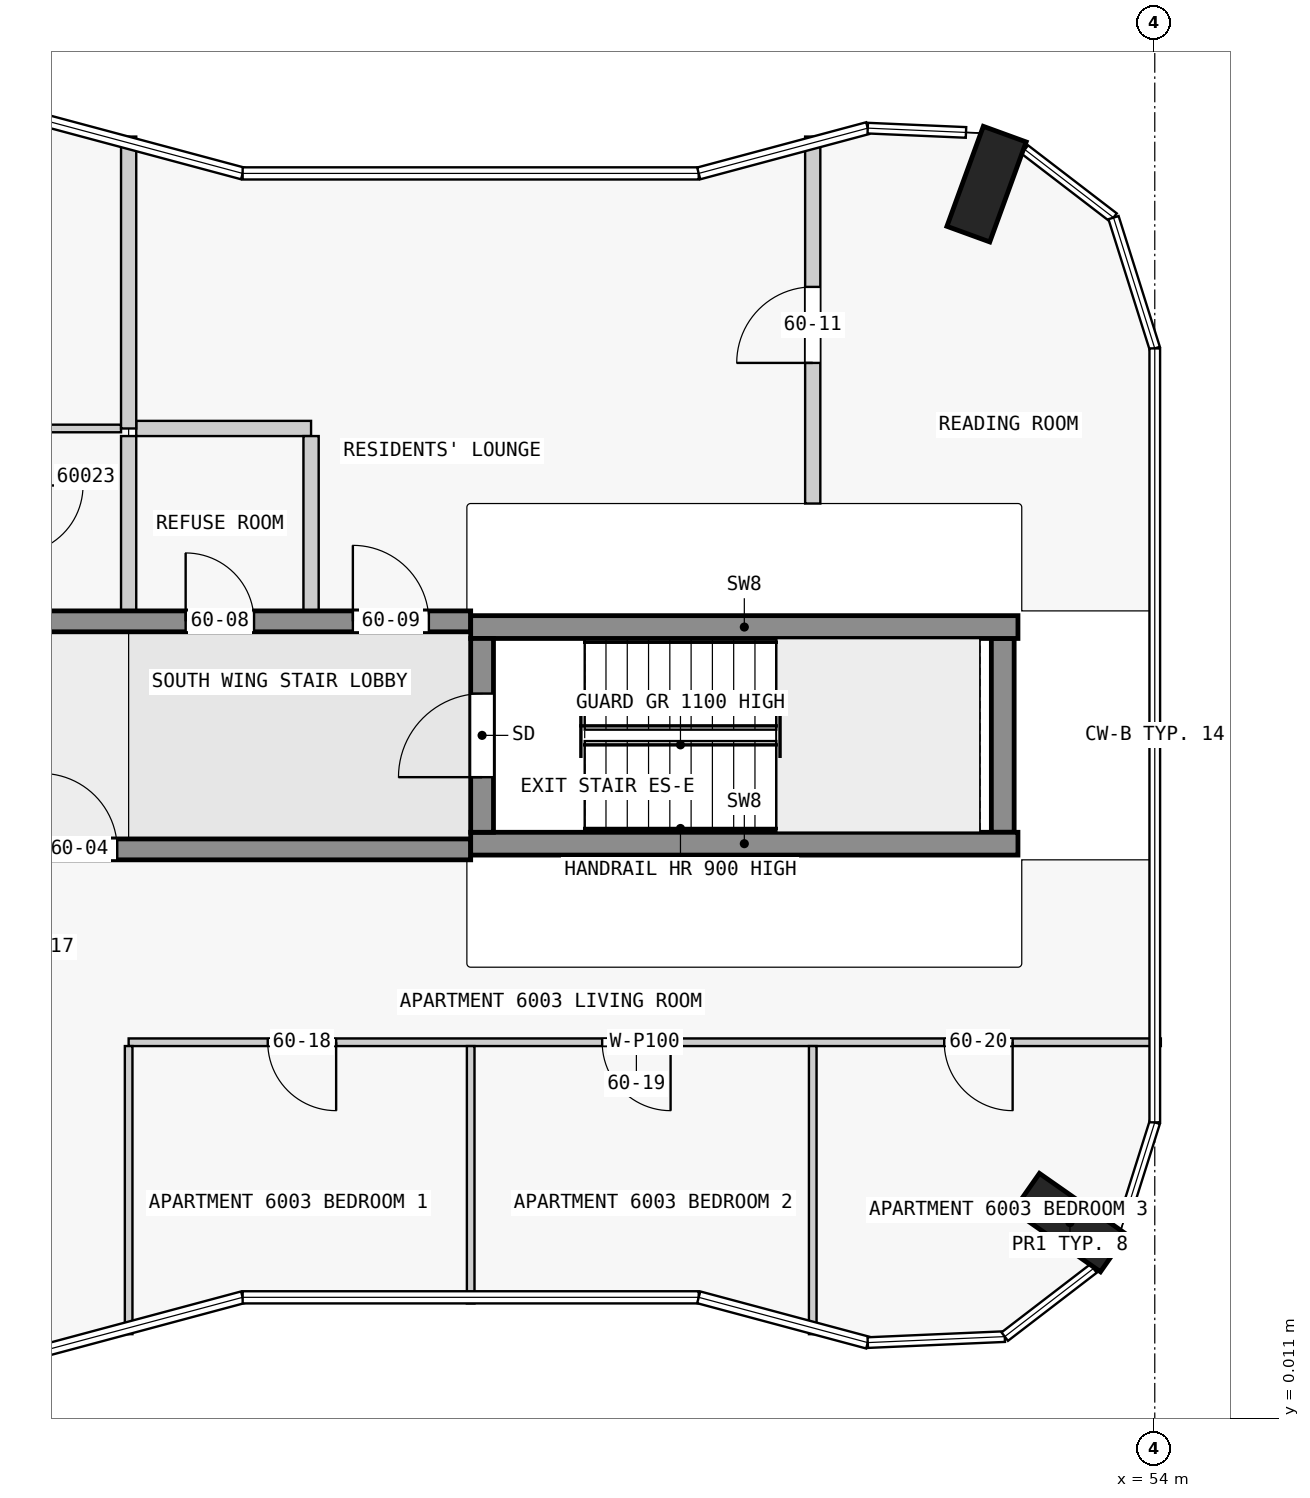
"""IFC4 building model, lengths in metres.
Left out: names, types, materials, properties, quantities, classifications, styles, units other than length and angle.
Written with IfcOpenShell. Run it as: python <this file> out.ifc"""

import sys

from ifc_helpers import new_model, si_unit, direction, frame, frame_2d, origin, origin_2d, place, context, subcontext, project, spatial, rectangle, extrude, element, fill, save


model = new_model("IFC4")
c1 = context("Model", 3, precision=1e-05, world=origin(), true_north=direction((0.0, 1.0)))
c2 = subcontext(c1, "Body", "Model", "MODEL_VIEW")
j1 = project(units=[si_unit("LENGTHUNIT", "METRE"), si_unit("PLANEANGLEUNIT", "RADIAN")], contexts=[c1])
p1 = place(None, origin())
s1 = spatial("IfcSite", under=j1, at=p1, CompositionType="ELEMENT")
p2 = place(p1, origin())
s2 = spatial("IfcBuilding", under=s1, at=p2, CompositionType="ELEMENT")
p3 = place(p2, frame((0.0, 0.0, 229.4)))
s3 = spatial("IfcBuildingStorey", under=s2, at=p3, CompositionType="ELEMENT", Elevation=229.4)
for number, where, z_axis, x_axis in (
    (1, (52.884, 2.59, 0.0), (0.0, 0.0, 1.0), (0.574, 0.819, 0.0)),
    (2, (51.787, 16.252, 0.0), (0.0, 0.0, 1.0), (-0.94, 0.342, 0.0)),
):
    element("IfcColumn", number, at=place(p3, frame(where, z_axis=z_axis, x_axis=x_axis)), inside=s3, PredefinedType="COLUMN", context=c2, shape_type="SweptSolid", body=[
        extrude(rectangle(XDim=0.6, YDim=1.4, at=origin_2d()), origin(), (0.0, 0.0, 1.0), 3.5),
    ])
p4 = place(p3, frame((45.15, 7.725, 0.0), z_axis=(0.0, 0.0, 1.0), x_axis=(0.0, 1.0, 0.0)))
e3 = element("IfcWall", 3, at=p4, inside=s3, PredefinedType="SHEAR", context=c2, shape_type="SweptSolid", body=[
    extrude(rectangle(XDim=2.55, YDim=0.3, at=frame_2d((1.275, 0.0))), origin(), (0.0, 0.0, 1.0), 3.5),
])
p5 = place(p4, frame((0.725, 0.0, 0.0)))
e4 = element("IfcOpeningElement", 4, at=p5, cuts=e3, PredefinedType="OPENING", context=c2, shape_type="SweptSolid", body=[
    extrude(rectangle(XDim=1.1, YDim=2.1, at=frame_2d((0.55, 1.05))), frame((0.0, 0.16, 0.0), z_axis=(0.0, -1.0, 0.0), x_axis=(1.0, 0.0, 0.0)), (0.0, 0.0, 1.0), 0.32),
])
p6 = place(p3, frame((52.0, 7.725, 0.0), z_axis=(0.0, 0.0, 1.0), x_axis=(0.0, 1.0, 0.0)))
e5 = element("IfcWall", 5, at=p6, inside=s3, PredefinedType="SHEAR", context=c2, shape_type="SweptSolid", body=[
    extrude(rectangle(XDim=2.55, YDim=0.3, at=frame_2d((1.275, 0.0))), origin(), (0.0, 0.0, 1.0), 3.5),
])
for number, where, z_axis, x_axis in (
    (6, (45.0, 7.575, 0.0), (0.0, 0.0, 1.0), (1.0, 0.0, 0.0)),
    (7, (45.0, 10.425, 0.0), (0.0, 0.0, 1.0), (1.0, 0.0, 0.0)),
):
    element("IfcWall", number, at=place(p3, frame(where, z_axis=z_axis, x_axis=x_axis)), inside=s3, PredefinedType="SHEAR", context=c2, shape_type="SweptSolid", body=[
        extrude(rectangle(XDim=7.2, YDim=0.3, at=frame_2d((3.6, 0.0))), origin(), (0.0, 0.0, 1.0), 3.5),
    ])
p7 = place(p3, frame((22.5, 7.5, 0.0), z_axis=(0.0, 0.0, 1.0), x_axis=(1.0, 0.0, 0.0)))
e8 = element("IfcWall", 8, at=p7, inside=s3, PredefinedType="SHEAR", context=c2, shape_type="SweptSolid", body=[
    extrude(rectangle(XDim=22.5, YDim=0.275, at=frame_2d((11.25, 0.0))), origin(), (0.0, 0.0, 1.0), 3.25),
])
p8 = place(p7, frame((1.75, 0.0, 0.0)))
e9 = element("IfcOpeningElement", 9, at=p8, cuts=e8, PredefinedType="OPENING", context=c2, shape_type="SweptSolid", body=[
    extrude(rectangle(XDim=1.0, YDim=2.1, at=frame_2d((0.5, 1.05))), frame((0.0, 0.147, 0.0), z_axis=(0.0, -1.0, 0.0), x_axis=(1.0, 0.0, 0.0)), (0.0, 0.0, 1.0), 0.295),
])
p9 = place(p7, frame((5.85, 0.0, 0.0)))
e10 = element("IfcOpeningElement", 10, at=p9, cuts=e8, PredefinedType="OPENING", context=c2, shape_type="SweptSolid", body=[
    extrude(rectangle(XDim=1.8, YDim=2.1, at=frame_2d((0.9, 1.05))), frame((0.0, 0.147, 0.0), z_axis=(0.0, -1.0, 0.0), x_axis=(1.0, 0.0, 0.0)), (0.0, 0.0, 1.0), 0.295),
])
p10 = place(p7, frame((10.75, 0.0, 0.0)))
e11 = element("IfcOpeningElement", 11, at=p10, cuts=e8, PredefinedType="OPENING", context=c2, shape_type="SweptSolid", body=[
    extrude(rectangle(XDim=1.0, YDim=2.1, at=frame_2d((0.5, 1.05))), frame((0.0, 0.147, 0.0), z_axis=(0.0, -1.0, 0.0), x_axis=(1.0, 0.0, 0.0)), (0.0, 0.0, 1.0), 0.295),
])
p11 = place(p7, frame((16.85, 0.0, 0.0)))
e12 = element("IfcOpeningElement", 12, at=p11, cuts=e8, PredefinedType="OPENING", context=c2, shape_type="SweptSolid", body=[
    extrude(rectangle(XDim=1.0, YDim=2.1, at=frame_2d((0.5, 1.05))), frame((0.0, 0.147, 0.0), z_axis=(0.0, -1.0, 0.0), x_axis=(1.0, 0.0, 0.0)), (0.0, 0.0, 1.0), 0.295),
])
p12 = place(p3, frame((22.5, 10.5, 0.0), z_axis=(0.0, 0.0, 1.0), x_axis=(1.0, 0.0, 0.0)))
e13 = element("IfcWall", 13, at=p12, inside=s3, PredefinedType="SHEAR", context=c2, shape_type="SweptSolid", body=[
    extrude(rectangle(XDim=22.5, YDim=0.275, at=frame_2d((11.25, 0.0))), origin(), (0.0, 0.0, 1.0), 3.25),
])
p13 = place(p12, frame((4.05, 0.0, 0.0)))
e14 = element("IfcOpeningElement", 14, at=p13, cuts=e13, PredefinedType="OPENING", context=c2, shape_type="SweptSolid", body=[
    extrude(rectangle(XDim=1.0, YDim=2.1, at=frame_2d((0.5, 1.05))), frame((0.0, 0.147, 0.0), z_axis=(0.0, -1.0, 0.0), x_axis=(1.0, 0.0, 0.0)), (0.0, 0.0, 1.0), 0.295),
])
p14 = place(p12, frame((10.75, 0.0, 0.0)))
e15 = element("IfcOpeningElement", 15, at=p14, cuts=e13, PredefinedType="OPENING", context=c2, shape_type="SweptSolid", body=[
    extrude(rectangle(XDim=1.0, YDim=2.1, at=frame_2d((0.5, 1.05))), frame((0.0, 0.147, 0.0), z_axis=(0.0, -1.0, 0.0), x_axis=(1.0, 0.0, 0.0)), (0.0, 0.0, 1.0), 0.295),
])
p15 = place(p12, frame((15.25, 0.0, 0.0)))
e16 = element("IfcOpeningElement", 16, at=p15, cuts=e13, PredefinedType="OPENING", context=c2, shape_type="SweptSolid", body=[
    extrude(rectangle(XDim=1.0, YDim=2.1, at=frame_2d((0.5, 1.05))), frame((0.0, 0.147, 0.0), z_axis=(0.0, -1.0, 0.0), x_axis=(1.0, 0.0, 0.0)), (0.0, 0.0, 1.0), 0.295),
])
p16 = place(p12, frame((18.75, 0.0, 0.0)))
e17 = element("IfcOpeningElement", 17, at=p16, cuts=e13, PredefinedType="OPENING", context=c2, shape_type="SweptSolid", body=[
    extrude(rectangle(XDim=0.9, YDim=2.1, at=frame_2d((0.45, 1.05))), frame((0.0, 0.147, 0.0), z_axis=(0.0, -1.0, 0.0), x_axis=(1.0, 0.0, 0.0)), (0.0, 0.0, 1.0), 0.295),
])
p17 = place(p12, frame((20.95, 0.0, 0.0)))
e18 = element("IfcOpeningElement", 18, at=p17, cuts=e13, PredefinedType="OPENING", context=c2, shape_type="SweptSolid", body=[
    extrude(rectangle(XDim=1.0, YDim=2.1, at=frame_2d((0.5, 1.05))), frame((0.0, 0.147, 0.0), z_axis=(0.0, -1.0, 0.0), x_axis=(1.0, 0.0, 0.0)), (0.0, 0.0, 1.0), 0.295),
])
p18 = place(p3, frame((54.08, 4.962, 0.0), z_axis=(0.0, 0.0, 1.0), x_axis=(-1.0, 0.0, 0.0)))
e19 = element("IfcWall", 19, at=p18, inside=s3, PredefinedType="PARTITIONING", context=c2, shape_type="SweptSolid", body=[
    extrude(rectangle(XDim=13.58, YDim=0.1, at=frame_2d((6.79, 0.0))), origin(), (0.0, 0.0, 1.0), 3.25),
])
p19 = place(p18, frame((10.85, 0.0, 0.0)))
e20 = element("IfcOpeningElement", 20, at=p19, cuts=e19, PredefinedType="OPENING", context=c2, shape_type="SweptSolid", body=[
    extrude(rectangle(XDim=0.9, YDim=2.1, at=frame_2d((0.45, 1.05))), frame((0.0, 0.06, 0.0), z_axis=(0.0, -1.0, 0.0), x_axis=(1.0, 0.0, 0.0)), (0.0, 0.0, 1.0), 0.12),
])
p20 = place(p18, frame((6.45, 0.0, 0.0)))
e21 = element("IfcOpeningElement", 21, at=p20, cuts=e19, PredefinedType="OPENING", context=c2, shape_type="SweptSolid", body=[
    extrude(rectangle(XDim=0.9, YDim=2.1, at=frame_2d((0.45, 1.05))), frame((0.0, 0.06, 0.0), z_axis=(0.0, -1.0, 0.0), x_axis=(1.0, 0.0, 0.0)), (0.0, 0.0, 1.0), 0.12),
])
p21 = place(p18, frame((1.95, 0.0, 0.0)))
e22 = element("IfcOpeningElement", 22, at=p21, cuts=e19, PredefinedType="OPENING", context=c2, shape_type="SweptSolid", body=[
    extrude(rectangle(XDim=0.9, YDim=2.1, at=frame_2d((0.45, 1.05))), frame((0.0, 0.06, 0.0), z_axis=(0.0, -1.0, 0.0), x_axis=(1.0, 0.0, 0.0)), (0.0, 0.0, 1.0), 0.12),
])
p22 = place(p3, frame((40.4, 13.038, 0.0), z_axis=(0.0, 0.0, 1.0), x_axis=(-1.0, 0.0, 0.0)))
e23 = element("IfcWall", 23, at=p22, inside=s3, PredefinedType="PARTITIONING", context=c2, shape_type="SweptSolid", body=[
    extrude(rectangle(XDim=1.35, YDim=0.1, at=frame_2d((0.675, 0.0))), origin(), (0.0, 0.0, 1.0), 3.25),
])
p23 = place(p3, frame((42.9, 13.038, 0.0), z_axis=(0.0, 0.0, 1.0), x_axis=(-1.0, 0.0, 0.0)))
e24 = element("IfcWall", 24, at=p23, inside=s3, PredefinedType="PARTITIONING", context=c2, shape_type="SweptSolid", body=[
    extrude(rectangle(XDim=2.3, YDim=0.2, at=frame_2d((1.15, 0.0))), origin(), (0.0, 0.0, 1.0), 3.25),
])
p24 = place(p3, frame((40.5, 4.913, 0.0), z_axis=(0.0, 0.0, 1.0), x_axis=(0.0, -1.0, 0.0)))
e25 = element("IfcWall", 25, at=p24, inside=s3, PredefinedType="PARTITIONING", context=c2, shape_type="SweptSolid", body=[
    extrude(rectangle(XDim=3.79, YDim=0.1, at=frame_2d((1.895, 0.0))), origin(), (0.0, 0.0, 1.0), 3.25),
])
p25 = place(p3, frame((40.5, 16.878, 0.0), z_axis=(0.0, 0.0, 1.0), x_axis=(0.0, -1.0, 0.0)))
e26 = element("IfcWall", 26, at=p25, inside=s3, PredefinedType="PARTITIONING", context=c2, shape_type="SweptSolid", body=[
    extrude(rectangle(XDim=3.84, YDim=0.2, at=frame_2d((1.92, 0.0))), origin(), (0.0, 0.0, 1.0), 3.25),
])
for number, where, z_axis, x_axis in (
    (27, (40.5, 10.637, 0.0), (0.0, 0.0, 1.0), (0.0, 1.0, 0.0)),
    (28, (42.9, 10.637, 0.0), (0.0, 0.0, 1.0), (0.0, 1.0, 0.0)),
):
    element("IfcWall", number, at=place(p3, frame(where, z_axis=z_axis, x_axis=x_axis)), inside=s3, PredefinedType="PARTITIONING", context=c2, shape_type="SweptSolid", body=[
        extrude(rectangle(XDim=2.3, YDim=0.2, at=frame_2d((1.15, 0.0))), origin(), (0.0, 0.0, 1.0), 3.25),
    ])
p26 = place(p3, frame((45.0, 1.527, 0.0), z_axis=(0.0, 0.0, 1.0), x_axis=(0.0, 1.0, 0.0)))
e29 = element("IfcWall", 29, at=p26, inside=s3, PredefinedType="PARTITIONING", context=c2, shape_type="SweptSolid", body=[
    extrude(rectangle(XDim=3.386, YDim=0.1, at=frame_2d((1.693, 0.0))), origin(), (0.0, 0.0, 1.0), 3.25),
])
p27 = place(p3, frame((49.5, 1.122, 0.0), z_axis=(0.0, 0.0, 1.0), x_axis=(0.0, 1.0, 0.0)))
e30 = element("IfcWall", 30, at=p27, inside=s3, PredefinedType="PARTITIONING", context=c2, shape_type="SweptSolid", body=[
    extrude(rectangle(XDim=3.79, YDim=0.1, at=frame_2d((1.895, 0.0))), origin(), (0.0, 0.0, 1.0), 3.25),
])
p28 = place(p3, frame((49.5, 12.05, 0.0), z_axis=(0.0, 0.0, 1.0), x_axis=(0.0, 1.0, 0.0)))
e31 = element("IfcWall", 31, at=p28, inside=s3, PredefinedType="PARTITIONING", context=c2, shape_type="SweptSolid", body=[
    extrude(rectangle(XDim=4.828, YDim=0.2, at=frame_2d((2.414, 0.0))), origin(), (0.0, 0.0, 1.0), 3.25),
])
p29 = place(p28, frame((1.85, 0.0, 0.0)))
e32 = element("IfcOpeningElement", 32, at=p29, cuts=e31, PredefinedType="OPENING", context=c2, shape_type="SweptSolid", body=[
    extrude(rectangle(XDim=1.0, YDim=2.1, at=frame_2d((0.5, 1.05))), frame((0.0, 0.11, 0.0), z_axis=(0.0, -1.0, 0.0), x_axis=(1.0, 0.0, 0.0)), (0.0, 0.0, 1.0), 0.22),
])
p30 = place(p5, origin())
e33 = element("IfcDoor", 33, at=p30, inside=s3, OperationType="SINGLE_SWING_LEFT", PredefinedType="DOOR", context=c2, shape_type="SweptSolid", body=[
    extrude(rectangle(XDim=1.1, YDim=2.1, at=frame_2d((0.55, 1.05))), frame((0.0, 0.025, 0.0), z_axis=(0.0, -1.0, 0.0), x_axis=(1.0, 0.0, 0.0)), (0.0, 0.0, 1.0), 0.05),
])
fill(e4, e33)
p31 = place(p11, origin())
e34 = element("IfcDoor", 34, at=p31, inside=s3, OperationType="SINGLE_SWING_RIGHT", PredefinedType="DOOR", context=c2, shape_type="SweptSolid", body=[
    extrude(rectangle(XDim=1.0, YDim=2.1, at=frame_2d((0.5, 1.05))), frame((0.0, 0.025, 0.0), z_axis=(0.0, -1.0, 0.0), x_axis=(1.0, 0.0, 0.0)), (0.0, 0.0, 1.0), 0.05),
])
fill(e12, e34)
p32 = place(p16, origin())
e35 = element("IfcDoor", 35, at=p32, inside=s3, OperationType="SINGLE_SWING_RIGHT", PredefinedType="DOOR", context=c2, shape_type="SweptSolid", body=[
    extrude(rectangle(XDim=0.9, YDim=2.1, at=frame_2d((0.45, 1.05))), frame((0.0, 0.025, 0.0), z_axis=(0.0, -1.0, 0.0), x_axis=(1.0, 0.0, 0.0)), (0.0, 0.0, 1.0), 0.05),
])
fill(e17, e35)
p33 = place(p17, origin())
e36 = element("IfcDoor", 36, at=p33, inside=s3, OperationType="SINGLE_SWING_RIGHT", PredefinedType="DOOR", context=c2, shape_type="SweptSolid", body=[
    extrude(rectangle(XDim=1.0, YDim=2.1, at=frame_2d((0.5, 1.05))), frame((0.0, 0.025, 0.0), z_axis=(0.0, -1.0, 0.0), x_axis=(1.0, 0.0, 0.0)), (0.0, 0.0, 1.0), 0.05),
])
fill(e18, e36)
p34 = place(p29, origin())
e37 = element("IfcDoor", 37, at=p34, inside=s3, OperationType="SINGLE_SWING_LEFT", PredefinedType="DOOR", context=c2, shape_type="SweptSolid", body=[
    extrude(rectangle(XDim=1.0, YDim=2.1, at=frame_2d((0.5, 1.05))), frame((0.0, 0.025, 0.0), z_axis=(0.0, -1.0, 0.0), x_axis=(1.0, 0.0, 0.0)), (0.0, 0.0, 1.0), 0.05),
])
fill(e32, e37)
p35 = place(p19, origin())
e38 = element("IfcDoor", 38, at=p35, inside=s3, OperationType="SINGLE_SWING_RIGHT", PredefinedType="DOOR", context=c2, shape_type="SweptSolid", body=[
    extrude(rectangle(XDim=0.9, YDim=2.1, at=frame_2d((0.45, 1.05))), frame((0.0, 0.025, 0.0), z_axis=(0.0, -1.0, 0.0), x_axis=(1.0, 0.0, 0.0)), (0.0, 0.0, 1.0), 0.05),
])
fill(e20, e38)
p36 = place(p20, origin())
e39 = element("IfcDoor", 39, at=p36, inside=s3, OperationType="SINGLE_SWING_RIGHT", PredefinedType="DOOR", context=c2, shape_type="SweptSolid", body=[
    extrude(rectangle(XDim=0.9, YDim=2.1, at=frame_2d((0.45, 1.05))), frame((0.0, 0.025, 0.0), z_axis=(0.0, -1.0, 0.0), x_axis=(1.0, 0.0, 0.0)), (0.0, 0.0, 1.0), 0.05),
])
fill(e21, e39)
p37 = place(p21, origin())
e40 = element("IfcDoor", 40, at=p37, inside=s3, OperationType="SINGLE_SWING_LEFT", PredefinedType="DOOR", context=c2, shape_type="SweptSolid", body=[
    extrude(rectangle(XDim=0.9, YDim=2.1, at=frame_2d((0.45, 1.05))), frame((0.0, 0.025, 0.0), z_axis=(0.0, -1.0, 0.0), x_axis=(1.0, 0.0, 0.0)), (0.0, 0.0, 1.0), 0.05),
])
fill(e22, e40)
save(model, sys.argv[1])
